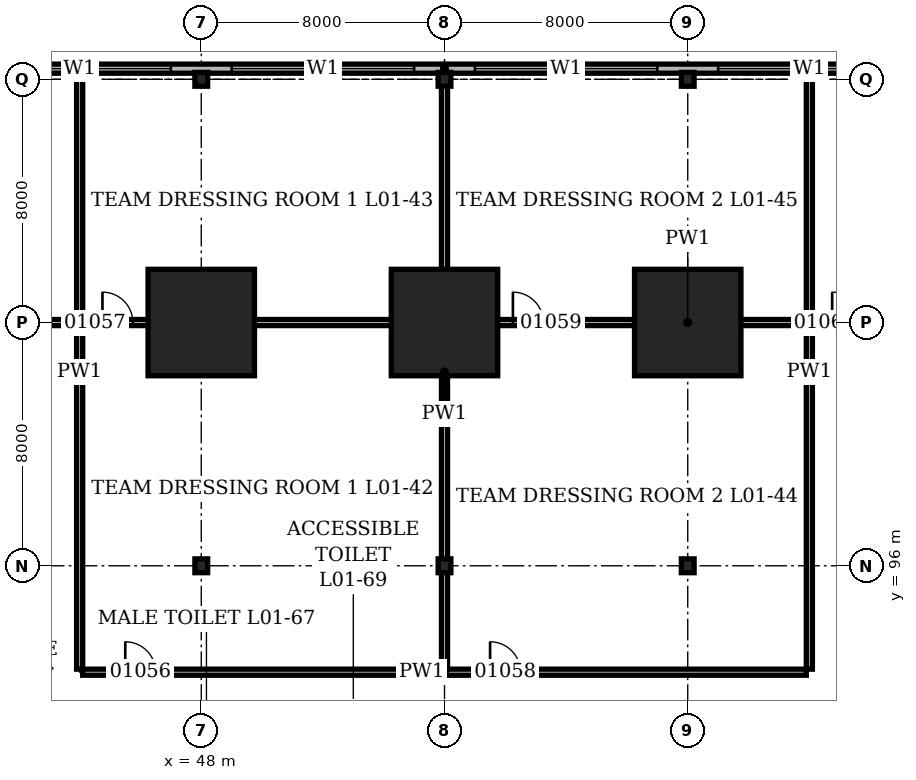
"""IFC4 building model, lengths in metres.
Left out: names, types, materials, properties, quantities, classifications, styles, units other than length and angle.
Written with IfcOpenShell. Run it as: python <this file> out.ifc"""

import sys

from ifc_helpers import new_model, si_unit, direction, frame, frame_2d, origin, origin_2d, place, context, subcontext, project, spatial, rectangle, hollow_rectangle, i_section, extrude, element, fill, save


model = new_model("IFC4")
c1 = context("Model", 3, precision=1e-05, world=origin(), true_north=direction((0.0, 1.0)))
c2 = subcontext(c1, "Body", "Model", "MODEL_VIEW")
j1 = project(units=[si_unit("LENGTHUNIT", "METRE"), si_unit("PLANEANGLEUNIT", "RADIAN")], contexts=[c1])
p1 = place(None, origin())
s1 = spatial("IfcSite", under=j1, at=p1, CompositionType="ELEMENT")
p2 = place(p1, origin())
s2 = spatial("IfcBuilding", under=s1, at=p2, CompositionType="ELEMENT")
p3 = place(p2, frame((0.0, 0.0, 4.9)))
s3 = spatial("IfcBuildingStorey", under=s2, at=p3, CompositionType="ELEMENT", Elevation=4.9)
p4 = place(p3, frame((48.0, 96.0, 0.0), z_axis=(0.0, 0.0, 1.0), x_axis=(1.0, 0.0, 0.0)))
e1 = element("IfcColumn", 1, at=p4, inside=s3, PredefinedType="COLUMN", context=c2, shape_type="SweptSolid", body=[
    extrude(i_section(OverallWidth=0.419, OverallDepth=0.455, WebThickness=0.042, FlangeThickness=0.068, at=origin_2d()), origin(), (0.0, 0.0, 1.0), 5.0),
])
p5 = place(p3, frame((48.0, 104.0, 0.0), z_axis=(0.0, 0.0, 1.0), x_axis=(1.0, 0.0, 0.0)))
e2 = element("IfcColumn", 2, at=p5, inside=s3, PredefinedType="COLUMN", context=c2, shape_type="SweptSolid", body=[
    extrude(hollow_rectangle(XDim=3.5, YDim=3.5, WallThickness=0.5, at=origin_2d()), origin(), (0.0, 0.0, 1.0), 5.0),
])
for number, where, z_axis, x_axis in (
    (3, (48.0, 112.0, 0.0), (0.0, 0.0, 1.0), (1.0, 0.0, 0.0)),
    (4, (56.0, 96.0, 0.0), (0.0, 0.0, 1.0), (1.0, 0.0, 0.0)),
):
    element("IfcColumn", number, at=place(p3, frame(where, z_axis=z_axis, x_axis=x_axis)), inside=s3, PredefinedType="COLUMN", context=c2, shape_type="SweptSolid", body=[
        extrude(i_section(OverallWidth=0.419, OverallDepth=0.455, WebThickness=0.042, FlangeThickness=0.068, at=origin_2d()), origin(), (0.0, 0.0, 1.0), 5.0),
    ])
p6 = place(p3, frame((56.0, 104.0, 0.0), z_axis=(0.0, 0.0, 1.0), x_axis=(1.0, 0.0, 0.0)))
e5 = element("IfcColumn", 5, at=p6, inside=s3, PredefinedType="COLUMN", context=c2, shape_type="SweptSolid", body=[
    extrude(hollow_rectangle(XDim=3.5, YDim=3.5, WallThickness=0.5, at=origin_2d()), origin(), (0.0, 0.0, 1.0), 5.0),
])
for number, where, z_axis, x_axis in (
    (6, (56.0, 112.0, 0.0), (0.0, 0.0, 1.0), (1.0, 0.0, 0.0)),
    (7, (64.0, 96.0, 0.0), (0.0, 0.0, 1.0), (1.0, 0.0, 0.0)),
):
    element("IfcColumn", number, at=place(p3, frame(where, z_axis=z_axis, x_axis=x_axis)), inside=s3, PredefinedType="COLUMN", context=c2, shape_type="SweptSolid", body=[
        extrude(i_section(OverallWidth=0.419, OverallDepth=0.455, WebThickness=0.042, FlangeThickness=0.068, at=origin_2d()), origin(), (0.0, 0.0, 1.0), 5.0),
    ])
p7 = place(p3, frame((64.0, 104.0, 0.0), z_axis=(0.0, 0.0, 1.0), x_axis=(1.0, 0.0, 0.0)))
e8 = element("IfcColumn", 8, at=p7, inside=s3, PredefinedType="COLUMN", context=c2, shape_type="SweptSolid", body=[
    extrude(hollow_rectangle(XDim=3.5, YDim=3.5, WallThickness=0.5, at=origin_2d()), origin(), (0.0, 0.0, 1.0), 5.0),
])
p8 = place(p3, frame((64.0, 112.0, 0.0), z_axis=(0.0, 0.0, 1.0), x_axis=(1.0, 0.0, 0.0)))
e9 = element("IfcColumn", 9, at=p8, inside=s3, PredefinedType="COLUMN", context=c2, shape_type="SweptSolid", body=[
    extrude(i_section(OverallWidth=0.419, OverallDepth=0.455, WebThickness=0.042, FlangeThickness=0.068, at=origin_2d()), origin(), (0.0, 0.0, 1.0), 5.0),
])
p9 = place(p3, frame((112.35, 112.35, 0.0), z_axis=(0.0, 0.0, 1.0), x_axis=(-1.0, 0.0, 0.0)))
e10 = element("IfcWall", 10, at=p9, inside=s3, PredefinedType="SOLIDWALL", context=c2, shape_type="SweptSolid", body=[
    extrude(rectangle(XDim=112.7, YDim=0.3, at=frame_2d((56.35, 0.0))), origin(), (0.0, 0.0, 1.0), 5.0),
])
p10 = place(p9, frame((1.35, 0.0, 1.0)))
e11 = element("IfcOpeningElement", 11, at=p10, cuts=e10, PredefinedType="OPENING", context=c2, shape_type="SweptSolid", body=[
    extrude(rectangle(XDim=6.0, YDim=1.5, at=frame_2d((3.0, 0.75))), frame((0.0, 0.16, 0.0), z_axis=(0.0, -1.0, 0.0), x_axis=(1.0, 0.0, 0.0)), (0.0, 0.0, 1.0), 0.32),
])
p11 = place(p9, frame((9.35, 0.0, 1.0)))
e12 = element("IfcOpeningElement", 12, at=p11, cuts=e10, PredefinedType="OPENING", context=c2, shape_type="SweptSolid", body=[
    extrude(rectangle(XDim=6.0, YDim=1.5, at=frame_2d((3.0, 0.75))), frame((0.0, 0.16, 0.0), z_axis=(0.0, -1.0, 0.0), x_axis=(1.0, 0.0, 0.0)), (0.0, 0.0, 1.0), 0.32),
])
p12 = place(p9, frame((17.35, 0.0, 1.0)))
e13 = element("IfcOpeningElement", 13, at=p12, cuts=e10, PredefinedType="OPENING", context=c2, shape_type="SweptSolid", body=[
    extrude(rectangle(XDim=6.0, YDim=1.5, at=frame_2d((3.0, 0.75))), frame((0.0, 0.16, 0.0), z_axis=(0.0, -1.0, 0.0), x_axis=(1.0, 0.0, 0.0)), (0.0, 0.0, 1.0), 0.32),
])
p13 = place(p9, frame((25.35, 0.0, 1.0)))
e14 = element("IfcOpeningElement", 14, at=p13, cuts=e10, PredefinedType="OPENING", context=c2, shape_type="SweptSolid", body=[
    extrude(rectangle(XDim=6.0, YDim=1.5, at=frame_2d((3.0, 0.75))), frame((0.0, 0.16, 0.0), z_axis=(0.0, -1.0, 0.0), x_axis=(1.0, 0.0, 0.0)), (0.0, 0.0, 1.0), 0.32),
])
p14 = place(p9, frame((33.35, 0.0, 1.0)))
e15 = element("IfcOpeningElement", 15, at=p14, cuts=e10, PredefinedType="OPENING", context=c2, shape_type="SweptSolid", body=[
    extrude(rectangle(XDim=6.0, YDim=1.5, at=frame_2d((3.0, 0.75))), frame((0.0, 0.16, 0.0), z_axis=(0.0, -1.0, 0.0), x_axis=(1.0, 0.0, 0.0)), (0.0, 0.0, 1.0), 0.32),
])
p15 = place(p9, frame((41.35, 0.0, 1.0)))
e16 = element("IfcOpeningElement", 16, at=p15, cuts=e10, PredefinedType="OPENING", context=c2, shape_type="SweptSolid", body=[
    extrude(rectangle(XDim=6.0, YDim=1.5, at=frame_2d((3.0, 0.75))), frame((0.0, 0.16, 0.0), z_axis=(0.0, -1.0, 0.0), x_axis=(1.0, 0.0, 0.0)), (0.0, 0.0, 1.0), 0.32),
])
p16 = place(p9, frame((49.35, 0.0, 1.0)))
e17 = element("IfcOpeningElement", 17, at=p16, cuts=e10, PredefinedType="OPENING", context=c2, shape_type="SweptSolid", body=[
    extrude(rectangle(XDim=6.0, YDim=1.5, at=frame_2d((3.0, 0.75))), frame((0.0, 0.16, 0.0), z_axis=(0.0, -1.0, 0.0), x_axis=(1.0, 0.0, 0.0)), (0.0, 0.0, 1.0), 0.32),
])
p17 = place(p9, frame((57.35, 0.0, 1.0)))
e18 = element("IfcOpeningElement", 18, at=p17, cuts=e10, PredefinedType="OPENING", context=c2, shape_type="SweptSolid", body=[
    extrude(rectangle(XDim=6.0, YDim=1.5, at=frame_2d((3.0, 0.75))), frame((0.0, 0.16, 0.0), z_axis=(0.0, -1.0, 0.0), x_axis=(1.0, 0.0, 0.0)), (0.0, 0.0, 1.0), 0.32),
])
p18 = place(p9, frame((65.35, 0.0, 1.0)))
e19 = element("IfcOpeningElement", 19, at=p18, cuts=e10, PredefinedType="OPENING", context=c2, shape_type="SweptSolid", body=[
    extrude(rectangle(XDim=6.0, YDim=1.5, at=frame_2d((3.0, 0.75))), frame((0.0, 0.16, 0.0), z_axis=(0.0, -1.0, 0.0), x_axis=(1.0, 0.0, 0.0)), (0.0, 0.0, 1.0), 0.32),
])
p19 = place(p9, frame((73.35, 0.0, 1.0)))
e20 = element("IfcOpeningElement", 20, at=p19, cuts=e10, PredefinedType="OPENING", context=c2, shape_type="SweptSolid", body=[
    extrude(rectangle(XDim=6.0, YDim=1.5, at=frame_2d((3.0, 0.75))), frame((0.0, 0.16, 0.0), z_axis=(0.0, -1.0, 0.0), x_axis=(1.0, 0.0, 0.0)), (0.0, 0.0, 1.0), 0.32),
])
p20 = place(p9, frame((81.35, 0.0, 1.0)))
e21 = element("IfcOpeningElement", 21, at=p20, cuts=e10, PredefinedType="OPENING", context=c2, shape_type="SweptSolid", body=[
    extrude(rectangle(XDim=6.0, YDim=1.5, at=frame_2d((3.0, 0.75))), frame((0.0, 0.16, 0.0), z_axis=(0.0, -1.0, 0.0), x_axis=(1.0, 0.0, 0.0)), (0.0, 0.0, 1.0), 0.32),
])
p21 = place(p9, frame((89.35, 0.0, 1.0)))
e22 = element("IfcOpeningElement", 22, at=p21, cuts=e10, PredefinedType="OPENING", context=c2, shape_type="SweptSolid", body=[
    extrude(rectangle(XDim=6.0, YDim=1.5, at=frame_2d((3.0, 0.75))), frame((0.0, 0.16, 0.0), z_axis=(0.0, -1.0, 0.0), x_axis=(1.0, 0.0, 0.0)), (0.0, 0.0, 1.0), 0.32),
])
p22 = place(p9, frame((97.35, 0.0, 1.0)))
e23 = element("IfcOpeningElement", 23, at=p22, cuts=e10, PredefinedType="OPENING", context=c2, shape_type="SweptSolid", body=[
    extrude(rectangle(XDim=6.0, YDim=1.5, at=frame_2d((3.0, 0.75))), frame((0.0, 0.16, 0.0), z_axis=(0.0, -1.0, 0.0), x_axis=(1.0, 0.0, 0.0)), (0.0, 0.0, 1.0), 0.32),
])
p23 = place(p9, frame((105.35, 0.0, 1.0)))
e24 = element("IfcOpeningElement", 24, at=p23, cuts=e10, PredefinedType="OPENING", context=c2, shape_type="SweptSolid", body=[
    extrude(rectangle(XDim=6.0, YDim=1.5, at=frame_2d((3.0, 0.75))), frame((0.0, 0.16, 0.0), z_axis=(0.0, -1.0, 0.0), x_axis=(1.0, 0.0, 0.0)), (0.0, 0.0, 1.0), 0.32),
])
p24 = place(p3, frame((44.1, 92.5, 0.0), z_axis=(0.0, 0.0, 1.0), x_axis=(1.0, 0.0, 0.0)))
e25 = element("IfcWall", 25, at=p24, inside=s3, PredefinedType="PARTITIONING", context=c2, shape_type="SweptSolid", body=[
    extrude(rectangle(XDim=23.8, YDim=0.2, at=frame_2d((11.9, 0.0))), origin(), (0.0, 0.0, 1.0), 4.8),
])
p25 = place(p24, frame((1.4, 0.0, 0.0)))
e26 = element("IfcOpeningElement", 26, at=p25, cuts=e25, PredefinedType="OPENING", context=c2, shape_type="SweptSolid", body=[
    extrude(rectangle(XDim=1.0, YDim=2.1, at=frame_2d((0.5, 1.05))), frame((0.0, 0.11, 0.0), z_axis=(0.0, -1.0, 0.0), x_axis=(1.0, 0.0, 0.0)), (0.0, 0.0, 1.0), 0.22),
])
p26 = place(p24, frame((13.4, 0.0, 0.0)))
e27 = element("IfcOpeningElement", 27, at=p26, cuts=e25, PredefinedType="OPENING", context=c2, shape_type="SweptSolid", body=[
    extrude(rectangle(XDim=1.0, YDim=2.1, at=frame_2d((0.5, 1.05))), frame((0.0, 0.11, 0.0), z_axis=(0.0, -1.0, 0.0), x_axis=(1.0, 0.0, 0.0)), (0.0, 0.0, 1.0), 0.22),
])
p27 = place(p3, frame((24.1, 104.0, 0.0), z_axis=(0.0, 0.0, 1.0), x_axis=(1.0, 0.0, 0.0)))
e28 = element("IfcWall", 28, at=p27, inside=s3, PredefinedType="PARTITIONING", context=c2, shape_type="SweptSolid", body=[
    extrude(rectangle(XDim=79.8, YDim=0.2, at=frame_2d((39.9, 0.0))), origin(), (0.0, 0.0, 1.0), 4.028),
])
p28 = place(p27, frame((1.0, 0.0, 0.0)))
e29 = element("IfcOpeningElement", 29, at=p28, cuts=e28, PredefinedType="OPENING", context=c2, shape_type="SweptSolid", body=[
    extrude(rectangle(XDim=1.8, YDim=2.4, at=frame_2d((0.9, 1.2))), frame((0.0, 0.11, 0.0), z_axis=(0.0, -1.0, 0.0), x_axis=(1.0, 0.0, 0.0)), (0.0, 0.0, 1.0), 0.22),
])
p29 = place(p27, frame((20.65, 0.0, 0.0)))
e30 = element("IfcOpeningElement", 30, at=p29, cuts=e28, PredefinedType="OPENING", context=c2, shape_type="SweptSolid", body=[
    extrude(rectangle(XDim=1.0, YDim=2.1, at=frame_2d((0.5, 1.05))), frame((0.0, 0.11, 0.0), z_axis=(0.0, -1.0, 0.0), x_axis=(1.0, 0.0, 0.0)), (0.0, 0.0, 1.0), 0.22),
])
p30 = place(p27, frame((34.15, 0.0, 0.0)))
e31 = element("IfcOpeningElement", 31, at=p30, cuts=e28, PredefinedType="OPENING", context=c2, shape_type="SweptSolid", body=[
    extrude(rectangle(XDim=1.0, YDim=2.1, at=frame_2d((0.5, 1.05))), frame((0.0, 0.11, 0.0), z_axis=(0.0, -1.0, 0.0), x_axis=(1.0, 0.0, 0.0)), (0.0, 0.0, 1.0), 0.22),
])
p31 = place(p27, frame((44.65, 0.0, 0.0)))
e32 = element("IfcOpeningElement", 32, at=p31, cuts=e28, PredefinedType="OPENING", context=c2, shape_type="SweptSolid", body=[
    extrude(rectangle(XDim=1.0, YDim=2.1, at=frame_2d((0.5, 1.05))), frame((0.0, 0.11, 0.0), z_axis=(0.0, -1.0, 0.0), x_axis=(1.0, 0.0, 0.0)), (0.0, 0.0, 1.0), 0.22),
])
p32 = place(p27, frame((65.4, 0.0, 0.0)))
e33 = element("IfcOpeningElement", 33, at=p32, cuts=e28, PredefinedType="OPENING", context=c2, shape_type="SweptSolid", body=[
    extrude(rectangle(XDim=1.0, YDim=2.1, at=frame_2d((0.5, 1.05))), frame((0.0, 0.11, 0.0), z_axis=(0.0, -1.0, 0.0), x_axis=(1.0, 0.0, 0.0)), (0.0, 0.0, 1.0), 0.22),
])
p33 = place(p3, frame((44.0, 92.6, 0.0), z_axis=(0.0, 0.0, 1.0), x_axis=(0.0, 1.0, 0.0)))
e34 = element("IfcWall", 34, at=p33, inside=s3, PredefinedType="PARTITIONING", context=c2, shape_type="SweptSolid", body=[
    extrude(rectangle(XDim=19.55, YDim=0.2, at=frame_2d((9.775, 0.0))), origin(), (0.0, 0.0, 1.0), 4.8),
])
p34 = place(p3, frame((56.0, 92.6, 0.0), z_axis=(0.0, 0.0, 1.0), x_axis=(0.0, 1.0, 0.0)))
e35 = element("IfcWall", 35, at=p34, inside=s3, PredefinedType="PARTITIONING", context=c2, shape_type="SweptSolid", body=[
    extrude(rectangle(XDim=19.55, YDim=0.2, at=frame_2d((9.775, 0.0))), origin(), (0.0, 0.0, 1.0), 4.028),
])
p35 = place(p3, frame((68.0, 92.6, 0.0), z_axis=(0.0, 0.0, 1.0), x_axis=(0.0, 1.0, 0.0)))
e36 = element("IfcWall", 36, at=p35, inside=s3, PredefinedType="PARTITIONING", context=c2, shape_type="SweptSolid", body=[
    extrude(rectangle(XDim=19.55, YDim=0.2, at=frame_2d((9.775, 0.0))), origin(), (0.0, 0.0, 1.0), 4.8),
])
p36 = place(p15, origin())
e37 = element("IfcWindow", 37, at=p36, inside=s3, PartitioningType="SINGLE_PANEL", PredefinedType="WINDOW", context=c2, shape_type="SweptSolid", body=[
    extrude(rectangle(XDim=6.0, YDim=1.5, at=frame_2d((3.0, 0.75))), frame((0.0, 0.03, 0.0), z_axis=(0.0, -1.0, 0.0), x_axis=(1.0, 0.0, 0.0)), (0.0, 0.0, 1.0), 0.06),
])
fill(e16, e37)
p37 = place(p16, origin())
e38 = element("IfcWindow", 38, at=p37, inside=s3, PartitioningType="SINGLE_PANEL", PredefinedType="WINDOW", context=c2, shape_type="SweptSolid", body=[
    extrude(rectangle(XDim=6.0, YDim=1.5, at=frame_2d((3.0, 0.75))), frame((0.0, 0.03, 0.0), z_axis=(0.0, -1.0, 0.0), x_axis=(1.0, 0.0, 0.0)), (0.0, 0.0, 1.0), 0.06),
])
fill(e17, e38)
p38 = place(p17, origin())
e39 = element("IfcWindow", 39, at=p38, inside=s3, PartitioningType="SINGLE_PANEL", PredefinedType="WINDOW", context=c2, shape_type="SweptSolid", body=[
    extrude(rectangle(XDim=6.0, YDim=1.5, at=frame_2d((3.0, 0.75))), frame((0.0, 0.03, 0.0), z_axis=(0.0, -1.0, 0.0), x_axis=(1.0, 0.0, 0.0)), (0.0, 0.0, 1.0), 0.06),
])
fill(e18, e39)
p39 = place(p18, origin())
e40 = element("IfcWindow", 40, at=p39, inside=s3, PartitioningType="SINGLE_PANEL", PredefinedType="WINDOW", context=c2, shape_type="SweptSolid", body=[
    extrude(rectangle(XDim=6.0, YDim=1.5, at=frame_2d((3.0, 0.75))), frame((0.0, 0.03, 0.0), z_axis=(0.0, -1.0, 0.0), x_axis=(1.0, 0.0, 0.0)), (0.0, 0.0, 1.0), 0.06),
])
fill(e19, e40)
p40 = place(p25, origin())
e41 = element("IfcDoor", 41, at=p40, inside=s3, OperationType="SINGLE_SWING_LEFT", PredefinedType="DOOR", context=c2, shape_type="SweptSolid", body=[
    extrude(rectangle(XDim=1.0, YDim=2.1, at=frame_2d((0.5, 1.05))), frame((0.0, 0.1, 0.0), z_axis=(0.0, -1.0, 0.0), x_axis=(1.0, 0.0, 0.0)), (0.0, 0.0, 1.0), 0.199),
])
fill(e26, e41)
p41 = place(p29, origin())
e42 = element("IfcDoor", 42, at=p41, inside=s3, OperationType="SINGLE_SWING_LEFT", PredefinedType="DOOR", context=c2, shape_type="SweptSolid", body=[
    extrude(rectangle(XDim=1.0, YDim=2.1, at=frame_2d((0.5, 1.05))), frame((0.0, 0.1, 0.0), z_axis=(0.0, -1.0, 0.0), x_axis=(1.0, 0.0, 0.0)), (0.0, 0.0, 1.0), 0.199),
])
fill(e30, e42)
p42 = place(p26, origin())
e43 = element("IfcDoor", 43, at=p42, inside=s3, OperationType="SINGLE_SWING_LEFT", PredefinedType="DOOR", context=c2, shape_type="SweptSolid", body=[
    extrude(rectangle(XDim=1.0, YDim=2.1, at=frame_2d((0.5, 1.05))), frame((0.0, 0.1, 0.0), z_axis=(0.0, -1.0, 0.0), x_axis=(1.0, 0.0, 0.0)), (0.0, 0.0, 1.0), 0.199),
])
fill(e27, e43)
p43 = place(p30, origin())
e44 = element("IfcDoor", 44, at=p43, inside=s3, OperationType="SINGLE_SWING_LEFT", PredefinedType="DOOR", context=c2, shape_type="SweptSolid", body=[
    extrude(rectangle(XDim=1.0, YDim=2.1, at=frame_2d((0.5, 1.05))), frame((0.0, 0.1, 0.0), z_axis=(0.0, -1.0, 0.0), x_axis=(1.0, 0.0, 0.0)), (0.0, 0.0, 1.0), 0.199),
])
fill(e31, e44)
p44 = place(p31, origin())
e45 = element("IfcDoor", 45, at=p44, inside=s3, OperationType="SINGLE_SWING_LEFT", PredefinedType="DOOR", context=c2, shape_type="SweptSolid", body=[
    extrude(rectangle(XDim=1.0, YDim=2.1, at=frame_2d((0.5, 1.05))), frame((0.0, 0.1, 0.0), z_axis=(0.0, -1.0, 0.0), x_axis=(1.0, 0.0, 0.0)), (0.0, 0.0, 1.0), 0.199),
])
fill(e32, e45)
save(model, sys.argv[1])
